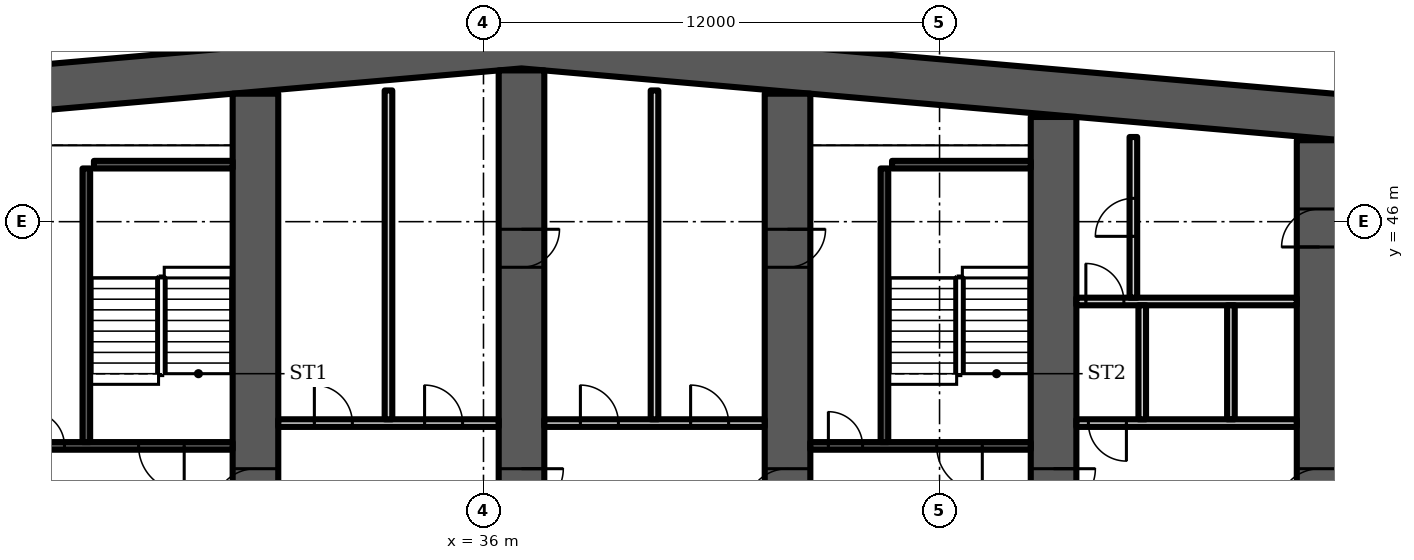
"""IFC4 building model, lengths in metres.
Left out: names, types, materials, properties, quantities, classifications, styles, units other than length and angle.
Written with IfcOpenShell. Run it as: python <this file> out.ifc"""

import sys

from ifc_helpers import new_model, si_unit, direction, frame, frame_2d, origin, place, context, subcontext, project, spatial, polyline, rectangle, outline, extrude, element, fill, save


model = new_model("IFC4")
c1 = context("Model", 3, precision=1e-05, world=origin(), true_north=direction((0.0, 1.0)))
c2 = subcontext(c1, "Body", "Model", "MODEL_VIEW")
j1 = project(units=[si_unit("LENGTHUNIT", "METRE"), si_unit("PLANEANGLEUNIT", "RADIAN")], contexts=[c1])
p1 = place(None, origin())
s1 = spatial("IfcSite", under=j1, at=p1, CompositionType="ELEMENT")
p2 = place(p1, origin())
s2 = spatial("IfcBuilding", under=s1, at=p2, CompositionType="ELEMENT")
p3 = place(p2, frame((0.0, 0.0, 48.7)))
s3 = spatial("IfcBuildingStorey", under=s2, at=p3, CompositionType="ELEMENT", Elevation=48.7)
p4 = place(p3, origin())
e1 = element("IfcWall", 1, at=p4, inside=s3, PredefinedType="SHEAR", context=c2, shape_type="SweptSolid", body=[
    extrude(outline(polyline([(9.0, 47.583), (37.0, 50.032), (65.0, 47.583), (65.0, 48.787), (37.0, 51.237), (9.0, 48.787), (9.0, 47.583)])), origin(), (0.0, 0.0, 1.0), 3.6),
])
p5 = place(p3, frame((30.0, 35.2, 0.0), z_axis=(0.0, 0.0, 1.0), x_axis=(0.0, 1.0, 0.0)))
e2 = element("IfcWall", 2, at=p5, inside=s3, PredefinedType="SHEAR", context=c2, shape_type="SweptSolid", body=[
    extrude(rectangle(XDim=14.168, YDim=1.2, at=frame_2d((7.084, 0.0))), origin(), (0.0, 0.0, 1.0), 3.6),
])
p6 = place(p5, frame((3.2, 0.0, 0.0)))
e3 = element("IfcOpeningElement", 3, at=p6, cuts=e2, PredefinedType="OPENING", context=c2, shape_type="SweptSolid", body=[
    extrude(rectangle(XDim=1.1, YDim=2.1, at=frame_2d((0.55, 1.05))), frame((0.0, 0.61, 0.0), z_axis=(0.0, -1.0, 0.0), x_axis=(1.0, 0.0, 0.0)), (0.0, 0.0, 1.0), 1.22),
])
p7 = place(p3, frame((37.0, 35.2, 0.0), z_axis=(0.0, 0.0, 1.0), x_axis=(0.0, 1.0, 0.0)))
e4 = element("IfcWall", 4, at=p7, inside=s3, PredefinedType="SHEAR", context=c2, shape_type="SweptSolid", body=[
    extrude(rectangle(XDim=14.78, YDim=1.2, at=frame_2d((7.39, 0.0))), origin(), (0.0, 0.0, 1.0), 3.6),
])
p8 = place(p7, frame((3.2, 0.0, 0.0)))
e5 = element("IfcOpeningElement", 5, at=p8, cuts=e4, PredefinedType="OPENING", context=c2, shape_type="SweptSolid", body=[
    extrude(rectangle(XDim=1.1, YDim=2.1, at=frame_2d((0.55, 1.05))), frame((0.0, 0.61, 0.0), z_axis=(0.0, -1.0, 0.0), x_axis=(1.0, 0.0, 0.0)), (0.0, 0.0, 1.0), 1.22),
])
p9 = place(p7, frame((9.6, 0.0, 0.0)))
e6 = element("IfcOpeningElement", 6, at=p9, cuts=e4, PredefinedType="OPENING", context=c2, shape_type="SweptSolid", body=[
    extrude(rectangle(XDim=1.0, YDim=2.1, at=frame_2d((0.5, 1.05))), frame((0.0, 0.61, 0.0), z_axis=(0.0, -1.0, 0.0), x_axis=(1.0, 0.0, 0.0)), (0.0, 0.0, 1.0), 1.22),
])
p10 = place(p3, frame((44.0, 35.2, 0.0), z_axis=(0.0, 0.0, 1.0), x_axis=(0.0, 1.0, 0.0)))
e7 = element("IfcWall", 7, at=p10, inside=s3, PredefinedType="SHEAR", context=c2, shape_type="SweptSolid", body=[
    extrude(rectangle(XDim=14.168, YDim=1.2, at=frame_2d((7.084, 0.0))), origin(), (0.0, 0.0, 1.0), 3.6),
])
p11 = place(p10, frame((3.2, 0.0, 0.0)))
e8 = element("IfcOpeningElement", 8, at=p11, cuts=e7, PredefinedType="OPENING", context=c2, shape_type="SweptSolid", body=[
    extrude(rectangle(XDim=1.1, YDim=2.1, at=frame_2d((0.55, 1.05))), frame((0.0, 0.61, 0.0), z_axis=(0.0, -1.0, 0.0), x_axis=(1.0, 0.0, 0.0)), (0.0, 0.0, 1.0), 1.22),
])
p12 = place(p10, frame((9.6, 0.0, 0.0)))
e9 = element("IfcOpeningElement", 9, at=p12, cuts=e7, PredefinedType="OPENING", context=c2, shape_type="SweptSolid", body=[
    extrude(rectangle(XDim=1.0, YDim=2.1, at=frame_2d((0.5, 1.05))), frame((0.0, 0.61, 0.0), z_axis=(0.0, -1.0, 0.0), x_axis=(1.0, 0.0, 0.0)), (0.0, 0.0, 1.0), 1.22),
])
p13 = place(p3, frame((51.0, 35.2, 0.0), z_axis=(0.0, 0.0, 1.0), x_axis=(0.0, 1.0, 0.0)))
e10 = element("IfcWall", 10, at=p13, inside=s3, PredefinedType="SHEAR", context=c2, shape_type="SweptSolid", body=[
    extrude(rectangle(XDim=13.555, YDim=1.2, at=frame_2d((6.778, 0.0))), origin(), (0.0, 0.0, 1.0), 3.6),
])
p14 = place(p13, frame((3.2, 0.0, 0.0)))
e11 = element("IfcOpeningElement", 11, at=p14, cuts=e10, PredefinedType="OPENING", context=c2, shape_type="SweptSolid", body=[
    extrude(rectangle(XDim=1.1, YDim=2.1, at=frame_2d((0.55, 1.05))), frame((0.0, 0.61, 0.0), z_axis=(0.0, -1.0, 0.0), x_axis=(1.0, 0.0, 0.0)), (0.0, 0.0, 1.0), 1.22),
])
p15 = place(p3, frame((58.0, 35.2, 0.0), z_axis=(0.0, 0.0, 1.0), x_axis=(0.0, 1.0, 0.0)))
e12 = element("IfcWall", 12, at=p15, inside=s3, PredefinedType="SHEAR", context=c2, shape_type="SweptSolid", body=[
    extrude(rectangle(XDim=12.943, YDim=1.2, at=frame_2d((6.471, 0.0))), origin(), (0.0, 0.0, 1.0), 3.6),
])
p16 = place(p15, frame((10.134, 0.0, 0.0)))
e13 = element("IfcOpeningElement", 13, at=p16, cuts=e12, PredefinedType="OPENING", context=c2, shape_type="SweptSolid", body=[
    extrude(rectangle(XDim=1.0, YDim=2.1, at=frame_2d((0.5, 1.05))), frame((0.0, 0.61, 0.0), z_axis=(0.0, -1.0, 0.0), x_axis=(1.0, 0.0, 0.0)), (0.0, 0.0, 1.0), 1.22),
])
p17 = place(p15, frame((3.2, 0.0, 0.0)))
e14 = element("IfcOpeningElement", 14, at=p17, cuts=e12, PredefinedType="OPENING", context=c2, shape_type="SweptSolid", body=[
    extrude(rectangle(XDim=1.1, YDim=2.1, at=frame_2d((0.55, 1.05))), frame((0.0, 0.61, 0.0), z_axis=(0.0, -1.0, 0.0), x_axis=(1.0, 0.0, 0.0)), (0.0, 0.0, 1.0), 1.22),
])
p18 = place(p3, frame((23.6, 40.1, 0.0), z_axis=(0.0, 0.0, 1.0), x_axis=(1.0, 0.0, 0.0)))
e15 = element("IfcWall", 15, at=p18, inside=s3, PredefinedType="SHEAR", context=c2, shape_type="SweptSolid", body=[
    extrude(rectangle(XDim=5.8, YDim=0.2, at=frame_2d((2.9, 0.0))), origin(), (0.0, 0.0, 1.0), 3.2),
])
p19 = place(p18, frame((3.325, 0.0, 0.0)))
e16 = element("IfcOpeningElement", 16, at=p19, cuts=e15, PredefinedType="OPENING", context=c2, shape_type="SweptSolid", body=[
    extrude(rectangle(XDim=1.2, YDim=2.1, at=frame_2d((0.6, 1.05))), frame((0.0, 0.11, 0.0), z_axis=(0.0, -1.0, 0.0), x_axis=(1.0, 0.0, 0.0)), (0.0, 0.0, 1.0), 0.22),
])
p20 = place(p18, frame((0.475, 0.0, 0.0)))
e17 = element("IfcOpeningElement", 17, at=p20, cuts=e15, PredefinedType="OPENING", context=c2, shape_type="SweptSolid", body=[
    extrude(rectangle(XDim=0.9, YDim=2.1, at=frame_2d((0.45, 1.05))), frame((0.0, 0.11, 0.0), z_axis=(0.0, -1.0, 0.0), x_axis=(1.0, 0.0, 0.0)), (0.0, 0.0, 1.0), 0.22),
])
p21 = place(p3, frame((25.55, 40.2, 0.0), z_axis=(0.0, 0.0, 1.0), x_axis=(0.0, 1.0, 0.0)))
e18 = element("IfcWall", 18, at=p21, inside=s3, PredefinedType="SHEAR", context=c2, shape_type="SweptSolid", body=[
    extrude(rectangle(XDim=7.2, YDim=0.2, at=frame_2d((3.6, 0.0))), origin(), (0.0, 0.0, 1.0), 3.2),
])
p22 = place(p3, frame((25.75, 47.5, 0.0), z_axis=(0.0, 0.0, 1.0), x_axis=(1.0, 0.0, 0.0)))
e19 = element("IfcWall", 19, at=p22, inside=s3, PredefinedType="SHEAR", context=c2, shape_type="SweptSolid", body=[
    extrude(rectangle(XDim=3.65, YDim=0.2, at=frame_2d((1.825, 0.0))), origin(), (0.0, 0.0, 1.0), 3.2),
])
p23 = place(p3, frame((30.6, 40.7, 0.0), z_axis=(0.0, 0.0, 1.0), x_axis=(1.0, 0.0, 0.0)))
e20 = element("IfcWall", 20, at=p23, inside=s3, PredefinedType="PARTITIONING", context=c2, shape_type="SweptSolid", body=[
    extrude(rectangle(XDim=5.8, YDim=0.2, at=frame_2d((2.9, 0.0))), origin(), (0.0, 0.0, 1.0), 3.2),
])
p24 = place(p23, frame((0.95, 0.0, 0.0)))
e21 = element("IfcOpeningElement", 21, at=p24, cuts=e20, PredefinedType="OPENING", context=c2, shape_type="SweptSolid", body=[
    extrude(rectangle(XDim=1.0, YDim=2.1, at=frame_2d((0.5, 1.05))), frame((0.0, 0.11, 0.0), z_axis=(0.0, -1.0, 0.0), x_axis=(1.0, 0.0, 0.0)), (0.0, 0.0, 1.0), 0.22),
])
p25 = place(p23, frame((3.85, 0.0, 0.0)))
e22 = element("IfcOpeningElement", 22, at=p25, cuts=e20, PredefinedType="OPENING", context=c2, shape_type="SweptSolid", body=[
    extrude(rectangle(XDim=1.0, YDim=2.1, at=frame_2d((0.5, 1.05))), frame((0.0, 0.11, 0.0), z_axis=(0.0, -1.0, 0.0), x_axis=(1.0, 0.0, 0.0)), (0.0, 0.0, 1.0), 0.22),
])
p26 = place(p3, frame((33.5, 40.8, 0.0), z_axis=(0.0, 0.0, 1.0), x_axis=(0.0, 1.0, 0.0)))
e23 = element("IfcWall", 23, at=p26, inside=s3, PredefinedType="PARTITIONING", context=c2, shape_type="SweptSolid", body=[
    extrude(rectangle(XDim=8.653, YDim=0.2, at=frame_2d((4.326, 0.0))), origin(), (0.0, 0.0, 1.0), 3.2),
])
p27 = place(p3, frame((37.6, 40.7, 0.0), z_axis=(0.0, 0.0, 1.0), x_axis=(1.0, 0.0, 0.0)))
e24 = element("IfcWall", 24, at=p27, inside=s3, PredefinedType="PARTITIONING", context=c2, shape_type="SweptSolid", body=[
    extrude(rectangle(XDim=5.8, YDim=0.2, at=frame_2d((2.9, 0.0))), origin(), (0.0, 0.0, 1.0), 3.2),
])
p28 = place(p27, frame((0.95, 0.0, 0.0)))
e25 = element("IfcOpeningElement", 25, at=p28, cuts=e24, PredefinedType="OPENING", context=c2, shape_type="SweptSolid", body=[
    extrude(rectangle(XDim=1.0, YDim=2.1, at=frame_2d((0.5, 1.05))), frame((0.0, 0.11, 0.0), z_axis=(0.0, -1.0, 0.0), x_axis=(1.0, 0.0, 0.0)), (0.0, 0.0, 1.0), 0.22),
])
p29 = place(p27, frame((3.85, 0.0, 0.0)))
e26 = element("IfcOpeningElement", 26, at=p29, cuts=e24, PredefinedType="OPENING", context=c2, shape_type="SweptSolid", body=[
    extrude(rectangle(XDim=1.0, YDim=2.1, at=frame_2d((0.5, 1.05))), frame((0.0, 0.11, 0.0), z_axis=(0.0, -1.0, 0.0), x_axis=(1.0, 0.0, 0.0)), (0.0, 0.0, 1.0), 0.22),
])
p30 = place(p3, frame((40.5, 40.8, 0.0), z_axis=(0.0, 0.0, 1.0), x_axis=(0.0, 1.0, 0.0)))
e27 = element("IfcWall", 27, at=p30, inside=s3, PredefinedType="PARTITIONING", context=c2, shape_type="SweptSolid", body=[
    extrude(rectangle(XDim=8.653, YDim=0.2, at=frame_2d((4.326, 0.0))), origin(), (0.0, 0.0, 1.0), 3.2),
])
p31 = place(p3, frame((44.6, 40.1, 0.0), z_axis=(0.0, 0.0, 1.0), x_axis=(1.0, 0.0, 0.0)))
e28 = element("IfcWall", 28, at=p31, inside=s3, PredefinedType="SHEAR", context=c2, shape_type="SweptSolid", body=[
    extrude(rectangle(XDim=5.8, YDim=0.2, at=frame_2d((2.9, 0.0))), origin(), (0.0, 0.0, 1.0), 3.2),
])
p32 = place(p31, frame((3.325, 0.0, 0.0)))
e29 = element("IfcOpeningElement", 29, at=p32, cuts=e28, PredefinedType="OPENING", context=c2, shape_type="SweptSolid", body=[
    extrude(rectangle(XDim=1.2, YDim=2.1, at=frame_2d((0.6, 1.05))), frame((0.0, 0.11, 0.0), z_axis=(0.0, -1.0, 0.0), x_axis=(1.0, 0.0, 0.0)), (0.0, 0.0, 1.0), 0.22),
])
p33 = place(p31, frame((0.475, 0.0, 0.0)))
e30 = element("IfcOpeningElement", 30, at=p33, cuts=e28, PredefinedType="OPENING", context=c2, shape_type="SweptSolid", body=[
    extrude(rectangle(XDim=0.9, YDim=2.1, at=frame_2d((0.45, 1.05))), frame((0.0, 0.11, 0.0), z_axis=(0.0, -1.0, 0.0), x_axis=(1.0, 0.0, 0.0)), (0.0, 0.0, 1.0), 0.22),
])
p34 = place(p3, frame((46.55, 40.2, 0.0), z_axis=(0.0, 0.0, 1.0), x_axis=(0.0, 1.0, 0.0)))
e31 = element("IfcWall", 31, at=p34, inside=s3, PredefinedType="SHEAR", context=c2, shape_type="SweptSolid", body=[
    extrude(rectangle(XDim=7.2, YDim=0.2, at=frame_2d((3.6, 0.0))), origin(), (0.0, 0.0, 1.0), 3.2),
])
p35 = place(p3, frame((46.75, 47.5, 0.0), z_axis=(0.0, 0.0, 1.0), x_axis=(1.0, 0.0, 0.0)))
e32 = element("IfcWall", 32, at=p35, inside=s3, PredefinedType="SHEAR", context=c2, shape_type="SweptSolid", body=[
    extrude(rectangle(XDim=3.65, YDim=0.2, at=frame_2d((1.825, 0.0))), origin(), (0.0, 0.0, 1.0), 3.2),
])
p36 = place(p3, frame((51.6, 40.7, 0.0), z_axis=(0.0, 0.0, 1.0), x_axis=(1.0, 0.0, 0.0)))
e33 = element("IfcWall", 33, at=p36, inside=s3, PredefinedType="PARTITIONING", context=c2, shape_type="SweptSolid", body=[
    extrude(rectangle(XDim=5.8, YDim=0.2, at=frame_2d((2.9, 0.0))), origin(), (0.0, 0.0, 1.0), 3.2),
])
p37 = place(p36, frame((0.317, 0.0, 0.0)))
e34 = element("IfcOpeningElement", 34, at=p37, cuts=e33, PredefinedType="OPENING", context=c2, shape_type="SweptSolid", body=[
    extrude(rectangle(XDim=1.0, YDim=2.1, at=frame_2d((0.5, 1.05))), frame((0.0, 0.11, 0.0), z_axis=(0.0, -1.0, 0.0), x_axis=(1.0, 0.0, 0.0)), (0.0, 0.0, 1.0), 0.22),
])
p38 = place(p3, frame((51.6, 43.9, 0.0), z_axis=(0.0, 0.0, 1.0), x_axis=(1.0, 0.0, 0.0)))
e35 = element("IfcWall", 35, at=p38, inside=s3, PredefinedType="PARTITIONING", context=c2, shape_type="SweptSolid", body=[
    extrude(rectangle(XDim=5.8, YDim=0.2, at=frame_2d((2.9, 0.0))), origin(), (0.0, 0.0, 1.0), 3.2),
])
p39 = place(p38, frame((0.25, 0.0, 0.0)))
e36 = element("IfcOpeningElement", 36, at=p39, cuts=e35, PredefinedType="OPENING", context=c2, shape_type="SweptSolid", body=[
    extrude(rectangle(XDim=1.0, YDim=2.1, at=frame_2d((0.5, 1.05))), frame((0.0, 0.11, 0.0), z_axis=(0.0, -1.0, 0.0), x_axis=(1.0, 0.0, 0.0)), (0.0, 0.0, 1.0), 0.22),
])
p40 = place(p3, frame((0.0, 0.0, -0.0)))
e37 = element("IfcWall", 37, at=p40, inside=s3, PredefinedType="PARTITIONING", context=c2, shape_type="SweptSolid", body=[
    extrude(outline(polyline([(53.233, 40.8), (53.233, 43.8), (53.433, 43.8), (53.433, 40.8), (53.233, 40.8)])), origin(), (0.0, 0.0, 1.0), 3.2),
])
p41 = place(p3, frame((0.0, 0.0, -0.0)))
e38 = element("IfcWall", 38, at=p41, inside=s3, PredefinedType="PARTITIONING", context=c2, shape_type="SweptSolid", body=[
    extrude(outline(polyline([(55.567, 40.8), (55.567, 43.8), (55.767, 43.8), (55.767, 40.8), (55.567, 40.8)])), origin(), (0.0, 0.0, 1.0), 3.2),
])
p42 = place(p3, frame((53.1, 44.0, 0.0), z_axis=(0.0, 0.0, 1.0), x_axis=(0.0, 1.0, 0.0)))
e39 = element("IfcWall", 39, at=p42, inside=s3, PredefinedType="PARTITIONING", context=c2, shape_type="SweptSolid", body=[
    extrude(rectangle(XDim=4.228, YDim=0.2, at=frame_2d((2.114, 0.0))), origin(), (0.0, 0.0, 1.0), 3.2),
])
p43 = place(p42, frame((1.614, 0.0, 0.0)))
e40 = element("IfcOpeningElement", 40, at=p43, cuts=e39, PredefinedType="OPENING", context=c2, shape_type="SweptSolid", body=[
    extrude(rectangle(XDim=1.0, YDim=2.1, at=frame_2d((0.5, 1.05))), frame((0.0, 0.11, 0.0), z_axis=(0.0, -1.0, 0.0), x_axis=(1.0, 0.0, 0.0)), (0.0, 0.0, 1.0), 0.22),
])
p44 = place(p19, origin())
e41 = element("IfcDoor", 41, at=p44, inside=s3, OperationType="SINGLE_SWING_RIGHT", PredefinedType="DOOR", context=c2, shape_type="SweptSolid", body=[
    extrude(rectangle(XDim=1.2, YDim=2.1, at=frame_2d((0.6, 1.05))), frame((0.0, 0.025, 0.0), z_axis=(0.0, -1.0, 0.0), x_axis=(1.0, 0.0, 0.0)), (0.0, 0.0, 1.0), 0.05),
])
fill(e16, e41)
p45 = place(p20, origin())
e42 = element("IfcDoor", 42, at=p45, inside=s3, OperationType="SINGLE_SWING_LEFT", PredefinedType="DOOR", context=c2, shape_type="SweptSolid", body=[
    extrude(rectangle(XDim=0.9, YDim=2.1, at=frame_2d((0.45, 1.05))), frame((0.0, 0.025, 0.0), z_axis=(0.0, -1.0, 0.0), x_axis=(1.0, 0.0, 0.0)), (0.0, 0.0, 1.0), 0.05),
])
fill(e17, e42)
p46 = place(p24, origin())
e43 = element("IfcDoor", 43, at=p46, inside=s3, OperationType="SINGLE_SWING_LEFT", PredefinedType="DOOR", context=c2, shape_type="SweptSolid", body=[
    extrude(rectangle(XDim=1.0, YDim=2.1, at=frame_2d((0.5, 1.05))), frame((0.0, 0.025, 0.0), z_axis=(0.0, -1.0, 0.0), x_axis=(1.0, 0.0, 0.0)), (0.0, 0.0, 1.0), 0.05),
])
fill(e21, e43)
p47 = place(p25, origin())
e44 = element("IfcDoor", 44, at=p47, inside=s3, OperationType="SINGLE_SWING_LEFT", PredefinedType="DOOR", context=c2, shape_type="SweptSolid", body=[
    extrude(rectangle(XDim=1.0, YDim=2.1, at=frame_2d((0.5, 1.05))), frame((0.0, 0.025, 0.0), z_axis=(0.0, -1.0, 0.0), x_axis=(1.0, 0.0, 0.0)), (0.0, 0.0, 1.0), 0.05),
])
fill(e22, e44)
p48 = place(p28, origin())
e45 = element("IfcDoor", 45, at=p48, inside=s3, OperationType="SINGLE_SWING_LEFT", PredefinedType="DOOR", context=c2, shape_type="SweptSolid", body=[
    extrude(rectangle(XDim=1.0, YDim=2.1, at=frame_2d((0.5, 1.05))), frame((0.0, 0.025, 0.0), z_axis=(0.0, -1.0, 0.0), x_axis=(1.0, 0.0, 0.0)), (0.0, 0.0, 1.0), 0.05),
])
fill(e25, e45)
p49 = place(p29, origin())
e46 = element("IfcDoor", 46, at=p49, inside=s3, OperationType="SINGLE_SWING_LEFT", PredefinedType="DOOR", context=c2, shape_type="SweptSolid", body=[
    extrude(rectangle(XDim=1.0, YDim=2.1, at=frame_2d((0.5, 1.05))), frame((0.0, 0.025, 0.0), z_axis=(0.0, -1.0, 0.0), x_axis=(1.0, 0.0, 0.0)), (0.0, 0.0, 1.0), 0.05),
])
fill(e26, e46)
p50 = place(p32, origin())
e47 = element("IfcDoor", 47, at=p50, inside=s3, OperationType="SINGLE_SWING_RIGHT", PredefinedType="DOOR", context=c2, shape_type="SweptSolid", body=[
    extrude(rectangle(XDim=1.2, YDim=2.1, at=frame_2d((0.6, 1.05))), frame((0.0, 0.025, 0.0), z_axis=(0.0, -1.0, 0.0), x_axis=(1.0, 0.0, 0.0)), (0.0, 0.0, 1.0), 0.05),
])
fill(e29, e47)
p51 = place(p33, origin())
e48 = element("IfcDoor", 48, at=p51, inside=s3, OperationType="SINGLE_SWING_LEFT", PredefinedType="DOOR", context=c2, shape_type="SweptSolid", body=[
    extrude(rectangle(XDim=0.9, YDim=2.1, at=frame_2d((0.45, 1.05))), frame((0.0, 0.025, 0.0), z_axis=(0.0, -1.0, 0.0), x_axis=(1.0, 0.0, 0.0)), (0.0, 0.0, 1.0), 0.05),
])
fill(e30, e48)
p52 = place(p37, origin())
e49 = element("IfcDoor", 49, at=p52, inside=s3, OperationType="SINGLE_SWING_RIGHT", PredefinedType="DOOR", context=c2, shape_type="SweptSolid", body=[
    extrude(rectangle(XDim=1.0, YDim=2.1, at=frame_2d((0.5, 1.05))), frame((0.0, 0.025, 0.0), z_axis=(0.0, -1.0, 0.0), x_axis=(1.0, 0.0, 0.0)), (0.0, 0.0, 1.0), 0.05),
])
fill(e34, e49)
p53 = place(p39, origin())
e50 = element("IfcDoor", 50, at=p53, inside=s3, OperationType="SINGLE_SWING_LEFT", PredefinedType="DOOR", context=c2, shape_type="SweptSolid", body=[
    extrude(rectangle(XDim=1.0, YDim=2.1, at=frame_2d((0.5, 1.05))), frame((0.0, 0.025, 0.0), z_axis=(0.0, -1.0, 0.0), x_axis=(1.0, 0.0, 0.0)), (0.0, 0.0, 1.0), 0.05),
])
fill(e36, e50)
p54 = place(p43, origin())
e51 = element("IfcDoor", 51, at=p54, inside=s3, OperationType="SINGLE_SWING_LEFT", PredefinedType="DOOR", context=c2, shape_type="SweptSolid", body=[
    extrude(rectangle(XDim=1.0, YDim=2.1, at=frame_2d((0.5, 1.05))), frame((0.0, 0.025, 0.0), z_axis=(0.0, -1.0, 0.0), x_axis=(1.0, 0.0, 0.0)), (0.0, 0.0, 1.0), 0.05),
])
fill(e40, e51)
p55 = place(p16, origin())
e52 = element("IfcDoor", 52, at=p55, inside=s3, OperationType="SINGLE_SWING_LEFT", PredefinedType="DOOR", context=c2, shape_type="SweptSolid", body=[
    extrude(rectangle(XDim=1.0, YDim=2.1, at=frame_2d((0.5, 1.05))), frame((0.0, 0.6, 0.0), z_axis=(0.0, -1.0, 0.0), x_axis=(1.0, 0.0, 0.0)), (0.0, 0.0, 1.0), 1.199),
])
fill(e13, e52)
p56 = place(p6, origin())
e53 = element("IfcDoor", 53, at=p56, inside=s3, OperationType="SINGLE_SWING_LEFT", PredefinedType="DOOR", context=c2, shape_type="SweptSolid", body=[
    extrude(rectangle(XDim=1.1, YDim=2.1, at=frame_2d((0.55, 1.05))), frame((0.0, 0.025, 0.0), z_axis=(0.0, -1.0, 0.0), x_axis=(1.0, 0.0, 0.0)), (0.0, 0.0, 1.0), 0.05),
])
fill(e3, e53)
p57 = place(p8, origin())
e54 = element("IfcDoor", 54, at=p57, inside=s3, OperationType="SINGLE_SWING_RIGHT", PredefinedType="DOOR", context=c2, shape_type="SweptSolid", body=[
    extrude(rectangle(XDim=1.1, YDim=2.1, at=frame_2d((0.55, 1.05))), frame((0.0, 0.025, 0.0), z_axis=(0.0, -1.0, 0.0), x_axis=(1.0, 0.0, 0.0)), (0.0, 0.0, 1.0), 0.05),
])
fill(e5, e54)
p58 = place(p9, origin())
e55 = element("IfcDoor", 55, at=p58, inside=s3, OperationType="SINGLE_SWING_RIGHT", PredefinedType="DOOR", context=c2, shape_type="SweptSolid", body=[
    extrude(rectangle(XDim=1.0, YDim=2.1, at=frame_2d((0.5, 1.05))), frame((0.0, 0.6, 0.0), z_axis=(0.0, -1.0, 0.0), x_axis=(1.0, 0.0, 0.0)), (0.0, 0.0, 1.0), 1.199),
])
fill(e6, e55)
p59 = place(p11, origin())
e56 = element("IfcDoor", 56, at=p59, inside=s3, OperationType="SINGLE_SWING_LEFT", PredefinedType="DOOR", context=c2, shape_type="SweptSolid", body=[
    extrude(rectangle(XDim=1.1, YDim=2.1, at=frame_2d((0.55, 1.05))), frame((0.0, 0.025, 0.0), z_axis=(0.0, -1.0, 0.0), x_axis=(1.0, 0.0, 0.0)), (0.0, 0.0, 1.0), 0.05),
])
fill(e8, e56)
p60 = place(p12, origin())
e57 = element("IfcDoor", 57, at=p60, inside=s3, OperationType="SINGLE_SWING_RIGHT", PredefinedType="DOOR", context=c2, shape_type="SweptSolid", body=[
    extrude(rectangle(XDim=1.0, YDim=2.1, at=frame_2d((0.5, 1.05))), frame((0.0, 0.6, 0.0), z_axis=(0.0, -1.0, 0.0), x_axis=(1.0, 0.0, 0.0)), (0.0, 0.0, 1.0), 1.199),
])
fill(e9, e57)
p61 = place(p14, origin())
e58 = element("IfcDoor", 58, at=p61, inside=s3, OperationType="SINGLE_SWING_RIGHT", PredefinedType="DOOR", context=c2, shape_type="SweptSolid", body=[
    extrude(rectangle(XDim=1.1, YDim=2.1, at=frame_2d((0.55, 1.05))), frame((0.0, 0.025, 0.0), z_axis=(0.0, -1.0, 0.0), x_axis=(1.0, 0.0, 0.0)), (0.0, 0.0, 1.0), 0.05),
])
fill(e11, e58)
p62 = place(p17, origin())
e59 = element("IfcDoor", 59, at=p62, inside=s3, OperationType="SINGLE_SWING_LEFT", PredefinedType="DOOR", context=c2, shape_type="SweptSolid", body=[
    extrude(rectangle(XDim=1.1, YDim=2.1, at=frame_2d((0.55, 1.05))), frame((0.0, 0.025, 0.0), z_axis=(0.0, -1.0, 0.0), x_axis=(1.0, 0.0, 0.0)), (0.0, 0.0, 1.0), 0.05),
])
fill(e14, e59)
save(model, sys.argv[1])
